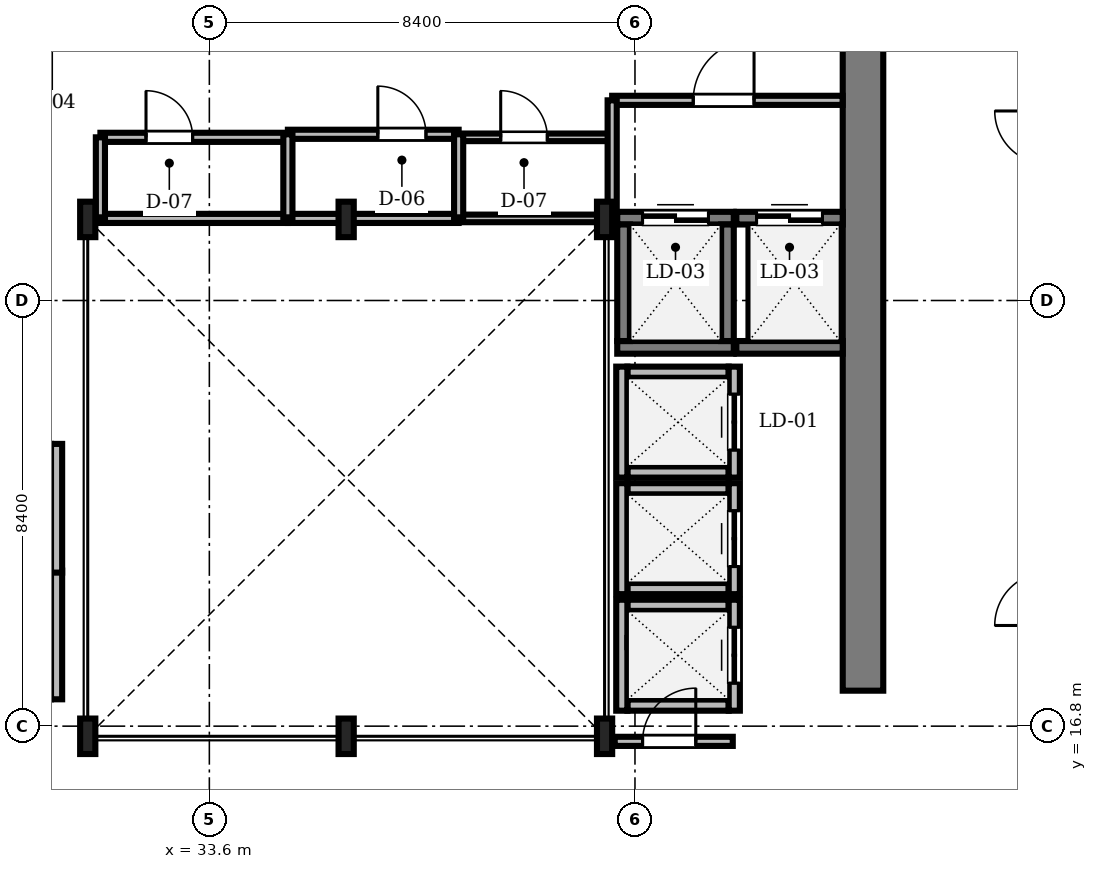
"""IFC4 building model, lengths in metres.
Left out: names, types, materials, properties, quantities, classifications, styles, units other than length and angle.
Written with IfcOpenShell. Run it as: python <this file> out.ifc"""

import sys

from ifc_helpers import new_model, si_unit, direction, frame, frame_2d, origin, origin_2d, place, context, subcontext, project, spatial, rectangle, i_section, extrude, source, transform, mapped, element, fill, save


model = new_model("IFC4")
c1 = context("Model", 3, precision=1e-05, world=origin(), true_north=direction((0.0, 1.0)))
c2 = subcontext(c1, "Body", "Model", "MODEL_VIEW")
j1 = project(units=[si_unit("LENGTHUNIT", "METRE"), si_unit("PLANEANGLEUNIT", "RADIAN")], contexts=[c1])
p1 = place(None, origin())
s1 = spatial("IfcSite", under=j1, at=p1, CompositionType="ELEMENT")
p2 = place(p1, origin())
s2 = spatial("IfcBuilding", under=s1, at=p2, CompositionType="ELEMENT")
p3 = place(p2, frame((0.0, 0.0, 218.55)))
s3 = spatial("IfcBuildingStorey", under=s2, at=p3, CompositionType="ELEMENT", Elevation=218.55)
m1 = source(origin(), c2, "Body", "SweptSolid", [
    extrude(rectangle(XDim=13.15, YDim=0.8, at=frame_2d((6.575, 0.0))), origin(), (0.0, 0.0, 1.0), 3.53),
])
p4 = place(p3, frame((46.5, 17.5, 0.0), z_axis=(0.0, 0.0, 1.0), x_axis=(0.0, 1.0, 0.0)))
e1 = element("IfcWall", 1, at=p4, inside=s3, PredefinedType="SHEAR", context=c2, shape_type="MappedRepresentation", body=[
    mapped(m1, transform((0.0, 0.0, 0.0), scale=1.0)),
])
m2 = source(origin(), c2, "Body", "SweptSolid", [
    extrude(i_section(OverallWidth=0.3, OverallDepth=0.7, WebThickness=0.017, FlangeThickness=0.032, FilletRadius=0.027, at=origin_2d()), origin(), (0.0, 0.0, 1.0), 3.53),
])
for number, where, z_axis, x_axis in (
    (2, (31.2, 16.6, 0.0), (0.0, 0.0, 1.0), (1.0, 0.0, 0.0)),
    (3, (36.3, 16.6, 0.0), (0.0, 0.0, 1.0), (1.0, 0.0, 0.0)),
    (4, (41.4, 16.6, 0.0), (0.0, 0.0, 1.0), (1.0, 0.0, 0.0)),
    (5, (41.4, 26.8, 0.0), (0.0, 0.0, 1.0), (1.0, 0.0, 0.0)),
    (6, (36.3, 26.8, 0.0), (0.0, 0.0, 1.0), (1.0, 0.0, 0.0)),
    (7, (31.2, 26.8, 0.0), (0.0, 0.0, 1.0), (1.0, 0.0, 0.0)),
):
    element("IfcColumn", number, at=place(p3, frame(where, z_axis=z_axis, x_axis=x_axis)), inside=s3, PredefinedType="COLUMN", context=c2, shape_type="MappedRepresentation", body=[
        mapped(m2, transform((0.0, 0.0, 0.0), scale=1.0)),
    ])
m3 = source(origin(), c2, "Body", "SweptSolid", [
    extrude(rectangle(XDim=2.0, YDim=0.22, at=frame_2d((1.0, 0.0))), origin(), (0.0, 0.0, 1.0), 3.53),
])
for number, where, z_axis, x_axis in (
    (8, (41.85, 21.815, 0.0), (0.0, 0.0, 1.0), (1.0, 0.0, 0.0)),
    (9, (41.85, 23.785, 0.0), (0.0, 0.0, 1.0), (1.0, 0.0, 0.0)),
):
    element("IfcWall", number, at=place(p3, frame(where, z_axis=z_axis, x_axis=x_axis)), inside=s3, PredefinedType="SOLIDWALL", context=c2, shape_type="MappedRepresentation", body=[
        mapped(m3, transform((0.0, 0.0, 0.0), scale=1.0)),
    ])
m4 = source(origin(), c2, "Body", "SweptSolid", [
    extrude(rectangle(XDim=2.19, YDim=0.22, at=frame_2d((1.095, 0.0))), origin(), (0.0, 0.0, 1.0), 3.53),
])
p5 = place(p3, frame((41.74, 21.705, 0.0), z_axis=(0.0, 0.0, 1.0), x_axis=(0.0, 1.0, 0.0)))
e10 = element("IfcWall", 10, at=p5, inside=s3, PredefinedType="SOLIDWALL", context=c2, shape_type="MappedRepresentation", body=[
    mapped(m4, transform((0.0, 0.0, 0.0), scale=1.0)),
])
p6 = place(p3, frame((43.96, 21.705, 0.0), z_axis=(0.0, 0.0, 1.0), x_axis=(0.0, 1.0, 0.0)))
e11 = element("IfcWall", 11, at=p6, inside=s3, PredefinedType="SOLIDWALL", context=c2, shape_type="MappedRepresentation", body=[
    mapped(m4, transform((0.0, 0.0, 0.0), scale=1.0)),
])
m5 = source(origin(), c2, "Body", "SweptSolid", [
    extrude(rectangle(XDim=1.1, YDim=2.2, at=frame_2d((0.55, 1.1))), frame((0.0, 0.12, 0.0), z_axis=(0.0, -1.0, 0.0), x_axis=(1.0, 0.0, 0.0)), (0.0, 0.0, 1.0), 0.24),
])
p7 = place(p6, frame((0.545, 0.0, 0.0)))
e12 = element("IfcOpeningElement", 12, at=p7, cuts=e11, PredefinedType="OPENING", context=c2, shape_type="MappedRepresentation", body=[
    mapped(m5, transform((0.0, 0.0, 0.0), scale=1.0)),
])
for number, where, z_axis, x_axis in (
    (13, (41.85, 19.515, 0.0), (0.0, 0.0, 1.0), (1.0, 0.0, 0.0)),
    (14, (41.85, 21.485, 0.0), (0.0, 0.0, 1.0), (1.0, 0.0, 0.0)),
):
    element("IfcWall", number, at=place(p3, frame(where, z_axis=z_axis, x_axis=x_axis)), inside=s3, PredefinedType="SOLIDWALL", context=c2, shape_type="MappedRepresentation", body=[
        mapped(m3, transform((0.0, 0.0, 0.0), scale=1.0)),
    ])
p8 = place(p3, frame((41.74, 19.405, 0.0), z_axis=(0.0, 0.0, 1.0), x_axis=(0.0, 1.0, 0.0)))
e15 = element("IfcWall", 15, at=p8, inside=s3, PredefinedType="SOLIDWALL", context=c2, shape_type="MappedRepresentation", body=[
    mapped(m4, transform((0.0, 0.0, 0.0), scale=1.0)),
])
p9 = place(p3, frame((43.96, 19.405, 0.0), z_axis=(0.0, 0.0, 1.0), x_axis=(0.0, 1.0, 0.0)))
e16 = element("IfcWall", 16, at=p9, inside=s3, PredefinedType="SOLIDWALL", context=c2, shape_type="MappedRepresentation", body=[
    mapped(m4, transform((0.0, 0.0, 0.0), scale=1.0)),
])
p10 = place(p9, frame((0.545, 0.0, 0.0)))
e17 = element("IfcOpeningElement", 17, at=p10, cuts=e16, PredefinedType="OPENING", context=c2, shape_type="MappedRepresentation", body=[
    mapped(m5, transform((0.0, 0.0, 0.0), scale=1.0)),
])
for number, where, z_axis, x_axis in (
    (18, (41.85, 17.215, 0.0), (0.0, 0.0, 1.0), (1.0, 0.0, 0.0)),
    (19, (41.85, 19.185, 0.0), (0.0, 0.0, 1.0), (1.0, 0.0, 0.0)),
):
    element("IfcWall", number, at=place(p3, frame(where, z_axis=z_axis, x_axis=x_axis)), inside=s3, PredefinedType="SOLIDWALL", context=c2, shape_type="MappedRepresentation", body=[
        mapped(m3, transform((0.0, 0.0, 0.0), scale=1.0)),
    ])
p11 = place(p3, frame((41.74, 17.105, 0.0), z_axis=(0.0, 0.0, 1.0), x_axis=(0.0, 1.0, 0.0)))
e20 = element("IfcWall", 20, at=p11, inside=s3, PredefinedType="SOLIDWALL", context=c2, shape_type="MappedRepresentation", body=[
    mapped(m4, transform((0.0, 0.0, 0.0), scale=1.0)),
])
p12 = place(p3, frame((43.96, 17.105, 0.0), z_axis=(0.0, 0.0, 1.0), x_axis=(0.0, 1.0, 0.0)))
e21 = element("IfcWall", 21, at=p12, inside=s3, PredefinedType="SOLIDWALL", context=c2, shape_type="MappedRepresentation", body=[
    mapped(m4, transform((0.0, 0.0, 0.0), scale=1.0)),
])
p13 = place(p12, frame((0.545, 0.0, 0.0)))
e22 = element("IfcOpeningElement", 22, at=p13, cuts=e21, PredefinedType="OPENING", context=c2, shape_type="MappedRepresentation", body=[
    mapped(m5, transform((0.0, 0.0, 0.0), scale=1.0)),
])
m6 = source(origin(), c2, "Body", "SweptSolid", [
    extrude(rectangle(XDim=2.54, YDim=0.22, at=frame_2d((1.27, 0.0))), origin(), (0.0, 0.0, 1.0), 3.53),
])
for number, where, z_axis, x_axis in (
    (23, (30.585, 17.33, 0.0), (0.0, 0.0, 1.0), (0.0, 1.0, 0.0)),
    (24, (30.585, 19.83, 0.0), (0.0, 0.0, 1.0), (0.0, 1.0, 0.0)),
):
    element("IfcWall", number, at=place(p3, frame(where, z_axis=z_axis, x_axis=x_axis)), inside=s3, PredefinedType="SOLIDWALL", context=c2, shape_type="MappedRepresentation", body=[
        mapped(m6, transform((0.0, 0.0, 0.0), scale=1.0)),
    ])
m7 = source(origin(), c2, "Body", "SweptSolid", [
    extrude(rectangle(XDim=2.3, YDim=0.25, at=frame_2d((1.15, 0.0))), origin(), (0.0, 0.0, 1.0), 3.53),
])
p14 = place(p3, frame((41.65, 24.275, 0.0), z_axis=(0.0, 0.0, 1.0), x_axis=(1.0, 0.0, 0.0)))
e25 = element("IfcWall", 25, at=p14, inside=s3, PredefinedType="SOLIDWALL", context=c2, shape_type="MappedRepresentation", body=[
    mapped(m7, transform((0.0, 0.0, 0.0), scale=1.0)),
])
p15 = place(p3, frame((41.65, 26.825, 0.0), z_axis=(0.0, 0.0, 1.0), x_axis=(1.0, 0.0, 0.0)))
e26 = element("IfcWall", 26, at=p15, inside=s3, PredefinedType="SOLIDWALL", context=c2, shape_type="MappedRepresentation", body=[
    mapped(m7, transform((0.0, 0.0, 0.0), scale=1.0)),
])
m8 = source(origin(), c2, "Body", "SweptSolid", [
    extrude(rectangle(XDim=1.3, YDim=2.3, at=frame_2d((0.65, 1.15))), frame((0.0, 0.135, 0.0), z_axis=(0.0, -1.0, 0.0), x_axis=(1.0, 0.0, 0.0)), (0.0, 0.0, 1.0), 0.27),
])
p16 = place(p15, frame((0.5, 0.0, 0.0)))
e27 = element("IfcOpeningElement", 27, at=p16, cuts=e26, PredefinedType="OPENING", context=c2, shape_type="MappedRepresentation", body=[
    mapped(m8, transform((0.0, 0.0, 0.0), scale=1.0)),
])
for number, where, z_axis, x_axis in (
    (28, (41.775, 24.4, 0.0), (0.0, 0.0, 1.0), (0.0, 1.0, 0.0)),
    (29, (43.825, 24.4, 0.0), (0.0, 0.0, 1.0), (0.0, 1.0, 0.0)),
):
    element("IfcWall", number, at=place(p3, frame(where, z_axis=z_axis, x_axis=x_axis)), inside=s3, PredefinedType="SOLIDWALL", context=c2, shape_type="MappedRepresentation", body=[
        mapped(m7, transform((0.0, 0.0, 0.0), scale=1.0)),
    ])
m9 = source(origin(), c2, "Body", "SweptSolid", [
    extrude(rectangle(XDim=2.1, YDim=0.25, at=frame_2d((1.05, 0.0))), origin(), (0.0, 0.0, 1.0), 3.53),
])
p17 = place(p3, frame((44.0, 24.275, 0.0), z_axis=(0.0, 0.0, 1.0), x_axis=(1.0, 0.0, 0.0)))
e30 = element("IfcWall", 30, at=p17, inside=s3, PredefinedType="SOLIDWALL", context=c2, shape_type="MappedRepresentation", body=[
    mapped(m9, transform((0.0, 0.0, 0.0), scale=1.0)),
])
p18 = place(p3, frame((44.0, 26.825, 0.0), z_axis=(0.0, 0.0, 1.0), x_axis=(1.0, 0.0, 0.0)))
e31 = element("IfcWall", 31, at=p18, inside=s3, PredefinedType="SOLIDWALL", context=c2, shape_type="MappedRepresentation", body=[
    mapped(m9, transform((0.0, 0.0, 0.0), scale=1.0)),
])
p19 = place(p18, frame((0.4, 0.0, 0.0)))
e32 = element("IfcOpeningElement", 32, at=p19, cuts=e31, PredefinedType="OPENING", context=c2, shape_type="MappedRepresentation", body=[
    mapped(m8, transform((0.0, 0.0, 0.0), scale=1.0)),
])
m10 = source(origin(), c2, "Body", "SweptSolid", [
    extrude(rectangle(XDim=4.548, YDim=0.18, at=frame_2d((2.274, 0.0))), origin(), (0.0, 0.0, 1.0), 3.162),
])
p20 = place(p3, frame((41.55, 29.15, 0.0), z_axis=(0.0, 0.0, 1.0), x_axis=(1.0, 0.0, 0.0)))
e33 = element("IfcWall", 33, at=p20, inside=s3, PredefinedType="PARTITIONING", context=c2, shape_type="MappedRepresentation", body=[
    mapped(m10, transform((0.0, 0.0, 0.0), scale=1.0)),
])
m11 = source(origin(), c2, "Body", "SweptSolid", [
    extrude(rectangle(XDim=1.2, YDim=2.2, at=frame_2d((0.6, 1.1))), frame((0.0, 0.1, 0.0), z_axis=(0.0, -1.0, 0.0), x_axis=(1.0, 0.0, 0.0)), (0.0, 0.0, 1.0), 0.2),
])
p21 = place(p20, frame((1.6, 0.0, 0.0)))
e34 = element("IfcOpeningElement", 34, at=p21, cuts=e33, PredefinedType="OPENING", context=c2, shape_type="MappedRepresentation", body=[
    mapped(m11, transform((0.0, 0.0, 0.0), scale=1.0)),
])
m12 = source(origin(), c2, "Body", "SweptSolid", [
    extrude(rectangle(XDim=3.7, YDim=0.18, at=frame_2d((1.85, 0.0))), origin(), (0.0, 0.0, 1.0), 3.162),
])
p22 = place(p3, frame((31.45, 28.42, 0.0), z_axis=(0.0, 0.0, 1.0), x_axis=(1.0, 0.0, 0.0)))
e35 = element("IfcWall", 35, at=p22, inside=s3, PredefinedType="PARTITIONING", context=c2, shape_type="MappedRepresentation", body=[
    mapped(m12, transform((0.0, 0.0, 0.0), scale=1.0)),
])
m13 = source(origin(), c2, "Body", "SweptSolid", [
    extrude(rectangle(XDim=0.92, YDim=2.1, at=frame_2d((0.46, 1.05))), frame((0.0, 0.1, 0.0), z_axis=(0.0, -1.0, 0.0), x_axis=(1.0, 0.0, 0.0)), (0.0, 0.0, 1.0), 0.2),
])
p23 = place(p22, frame((0.9, 0.0, 0.0)))
e36 = element("IfcOpeningElement", 36, at=p23, cuts=e35, PredefinedType="OPENING", context=c2, shape_type="MappedRepresentation", body=[
    mapped(m13, transform((0.0, 0.0, 0.0), scale=1.0)),
])
m14 = source(origin(), c2, "Body", "SweptSolid", [
    extrude(rectangle(XDim=3.37, YDim=0.18, at=frame_2d((1.685, 0.0))), origin(), (0.0, 0.0, 1.0), 3.53),
])
p24 = place(p3, frame((35.15, 28.48, 0.0), z_axis=(0.0, 0.0, 1.0), x_axis=(1.0, 0.0, 0.0)))
e37 = element("IfcWall", 37, at=p24, inside=s3, PredefinedType="PARTITIONING", context=c2, shape_type="MappedRepresentation", body=[
    mapped(m14, transform((0.0, 0.0, 0.0), scale=1.0)),
])
m15 = source(origin(), c2, "Body", "SweptSolid", [
    extrude(rectangle(XDim=0.95, YDim=2.15, at=frame_2d((0.475, 1.075))), frame((0.0, 0.1, 0.0), z_axis=(0.0, -1.0, 0.0), x_axis=(1.0, 0.0, 0.0)), (0.0, 0.0, 1.0), 0.2),
])
p25 = place(p24, frame((1.775, 0.0, 0.0)))
e38 = element("IfcOpeningElement", 38, at=p25, cuts=e37, PredefinedType="OPENING", context=c2, shape_type="MappedRepresentation", body=[
    mapped(m15, transform((0.0, 0.0, 0.0), scale=1.0)),
])
m16 = source(origin(), c2, "Body", "SweptSolid", [
    extrude(rectangle(XDim=3.0, YDim=0.15, at=frame_2d((1.5, 0.0))), origin(), (0.0, 0.0, 1.0), 3.53),
])
p26 = place(p3, frame((38.52, 28.42, 0.0), z_axis=(0.0, 0.0, 1.0), x_axis=(1.0, 0.0, 0.0)))
e39 = element("IfcWall", 39, at=p26, inside=s3, PredefinedType="PARTITIONING", context=c2, shape_type="MappedRepresentation", body=[
    mapped(m16, transform((0.0, 0.0, 0.0), scale=1.0)),
])
m17 = source(origin(), c2, "Body", "SweptSolid", [
    extrude(rectangle(XDim=0.92, YDim=2.1, at=frame_2d((0.46, 1.05))), frame((0.0, 0.085, 0.0), z_axis=(0.0, -1.0, 0.0), x_axis=(1.0, 0.0, 0.0)), (0.0, 0.0, 1.0), 0.17),
])
p27 = place(p26, frame((0.83, 0.0, 0.0)))
e40 = element("IfcOpeningElement", 40, at=p27, cuts=e39, PredefinedType="OPENING", context=c2, shape_type="MappedRepresentation", body=[
    mapped(m17, transform((0.0, 0.0, 0.0), scale=1.0)),
])
m18 = source(origin(), c2, "Body", "SweptSolid", [
    extrude(rectangle(XDim=2.33, YDim=0.18, at=frame_2d((1.165, 0.0))), origin(), (0.0, 0.0, 1.0), 2.972),
])
p28 = place(p3, frame((41.6, 16.5, 0.0), z_axis=(0.0, 0.0, 1.0), x_axis=(1.0, 0.0, 0.0)))
e41 = element("IfcWall", 41, at=p28, inside=s3, PredefinedType="PARTITIONING", context=c2, shape_type="MappedRepresentation", body=[
    mapped(m18, transform((0.0, 0.0, 0.0), scale=1.0)),
])
m19 = source(origin(), c2, "Body", "SweptSolid", [
    extrude(rectangle(XDim=1.05, YDim=2.2, at=frame_2d((0.525, 1.1))), frame((0.0, 0.1, 0.0), z_axis=(0.0, -1.0, 0.0), x_axis=(1.0, 0.0, 0.0)), (0.0, 0.0, 1.0), 0.2),
])
p29 = place(p28, frame((0.55, 0.0, 0.0)))
e42 = element("IfcOpeningElement", 42, at=p29, cuts=e41, PredefinedType="OPENING", context=c2, shape_type="MappedRepresentation", body=[
    mapped(m19, transform((0.0, 0.0, 0.0), scale=1.0)),
])
m20 = source(origin(), c2, "Body", "SweptSolid", [
    extrude(rectangle(XDim=3.7, YDim=0.18, at=frame_2d((1.85, 0.0))), origin(), (0.0, 0.0, 1.0), 3.072),
])
p30 = place(p3, frame((31.45, 26.82, 0.0), z_axis=(0.0, 0.0, 1.0), x_axis=(1.0, 0.0, 0.0)))
e43 = element("IfcWall", 43, at=p30, inside=s3, PredefinedType="PARTITIONING", context=c2, shape_type="MappedRepresentation", body=[
    mapped(m20, transform((0.0, 0.0, 0.0), scale=1.0)),
])
m21 = source(origin(), c2, "Body", "SweptSolid", [
    extrude(rectangle(XDim=3.37, YDim=0.18, at=frame_2d((1.685, 0.0))), origin(), (0.0, 0.0, 1.0), 3.072),
])
p31 = place(p3, frame((35.15, 26.82, 0.0), z_axis=(0.0, 0.0, 1.0), x_axis=(1.0, 0.0, 0.0)))
e44 = element("IfcWall", 44, at=p31, inside=s3, PredefinedType="PARTITIONING", context=c2, shape_type="MappedRepresentation", body=[
    mapped(m21, transform((0.0, 0.0, 0.0), scale=1.0)),
])
m22 = source(origin(), c2, "Body", "SweptSolid", [
    extrude(rectangle(XDim=3.0, YDim=0.15, at=frame_2d((1.5, 0.0))), origin(), (0.0, 0.0, 1.0), 2.972),
])
p32 = place(p3, frame((38.52, 26.82, 0.0), z_axis=(0.0, 0.0, 1.0), x_axis=(1.0, 0.0, 0.0)))
e45 = element("IfcWall", 45, at=p32, inside=s3, PredefinedType="PARTITIONING", context=c2, shape_type="MappedRepresentation", body=[
    mapped(m22, transform((0.0, 0.0, 0.0), scale=1.0)),
])
m23 = source(origin(), c2, "Body", "SweptSolid", [
    extrude(rectangle(XDim=2.35, YDim=0.18, at=frame_2d((1.175, 0.0))), origin(), (0.0, 0.0, 1.0), 2.972),
])
p33 = place(p3, frame((41.55, 26.8, 0.0), z_axis=(0.0, 0.0, 1.0), x_axis=(0.0, 1.0, 0.0)))
e46 = element("IfcWall", 46, at=p33, inside=s3, PredefinedType="PARTITIONING", context=c2, shape_type="MappedRepresentation", body=[
    mapped(m23, transform((0.0, 0.0, 0.0), scale=1.0)),
])
m24 = source(origin(), c2, "Body", "SweptSolid", [
    extrude(rectangle(XDim=1.858, YDim=0.18, at=frame_2d((0.929, 0.0))), origin(), (0.0, 0.0, 1.0), 3.53),
])
p34 = place(p3, frame((41.852, 18.45, 0.0), z_axis=(0.0, 0.0, 1.0), x_axis=(1.0, 0.0, 0.0)))
e47 = element("IfcWall", 47, at=p34, inside=s3, PredefinedType="PARTITIONING", context=c2, shape_type="MappedRepresentation", body=[
    mapped(m24, transform((0.0, 0.0, 0.0), scale=1.0)),
])
m25 = source(origin(), c2, "Body", "SweptSolid", [
    extrude(rectangle(XDim=1.66, YDim=0.18, at=frame_2d((0.83, 0.0))), origin(), (0.0, 0.0, 1.0), 3.072),
])
for number, where, z_axis, x_axis in (
    (48, (35.15, 26.82, 0.0), (0.0, 0.0, 1.0), (0.0, 1.0, 0.0)),
    (49, (38.52, 26.82, 0.0), (0.0, 0.0, 1.0), (0.0, 1.0, 0.0)),
):
    element("IfcWall", number, at=place(p3, frame(where, z_axis=z_axis, x_axis=x_axis)), inside=s3, PredefinedType="PARTITIONING", context=c2, shape_type="MappedRepresentation", body=[
        mapped(m25, transform((0.0, 0.0, 0.0), scale=1.0)),
    ])
m26 = source(origin(), c2, "Body", "SweptSolid", [
    extrude(rectangle(XDim=1.6, YDim=0.18, at=frame_2d((0.8, 0.0))), origin(), (0.0, 0.0, 1.0), 3.072),
])
p35 = place(p3, frame((31.45, 26.82, 0.0), z_axis=(0.0, 0.0, 1.0), x_axis=(0.0, 1.0, 0.0)))
e50 = element("IfcWall", 50, at=p35, inside=s3, PredefinedType="PARTITIONING", context=c2, shape_type="MappedRepresentation", body=[
    mapped(m26, transform((0.0, 0.0, 0.0), scale=1.0)),
])
m27 = source(origin(), c2, "Body", "SweptSolid", [
    extrude(rectangle(XDim=1.1, YDim=2.2, at=frame_2d((0.55, 1.1))), frame((0.0, 0.025, 0.0), z_axis=(0.0, -1.0, 0.0), x_axis=(1.0, 0.0, 0.0)), (0.0, 0.0, 1.0), 0.05),
])
p36 = place(p7, origin())
e51 = element("IfcDoor", 51, at=p36, inside=s3, OperationType="DOUBLE_DOOR_SLIDING", PredefinedType="DOOR", context=c2, shape_type="MappedRepresentation", body=[
    mapped(m27, transform((0.0, 0.0, 0.0), scale=1.0)),
])
fill(e12, e51)
p37 = place(p10, origin())
e52 = element("IfcDoor", 52, at=p37, inside=s3, OperationType="DOUBLE_DOOR_SLIDING", PredefinedType="DOOR", context=c2, shape_type="MappedRepresentation", body=[
    mapped(m27, transform((0.0, 0.0, 0.0), scale=1.0)),
])
fill(e17, e52)
p38 = place(p13, origin())
e53 = element("IfcDoor", 53, at=p38, inside=s3, OperationType="DOUBLE_DOOR_SLIDING", PredefinedType="DOOR", context=c2, shape_type="MappedRepresentation", body=[
    mapped(m27, transform((0.0, 0.0, 0.0), scale=1.0)),
])
fill(e22, e53)
m28 = source(origin(), c2, "Body", "SweptSolid", [
    extrude(rectangle(XDim=1.3, YDim=2.3, at=frame_2d((0.65, 1.15))), frame((0.0, 0.025, 0.0), z_axis=(0.0, -1.0, 0.0), x_axis=(1.0, 0.0, 0.0)), (0.0, 0.0, 1.0), 0.05),
])
p39 = place(p16, origin())
e54 = element("IfcDoor", 54, at=p39, inside=s3, OperationType="DOUBLE_DOOR_SLIDING", PredefinedType="DOOR", context=c2, shape_type="MappedRepresentation", body=[
    mapped(m28, transform((0.0, 0.0, 0.0), scale=1.0)),
])
fill(e27, e54)
p40 = place(p19, origin())
e55 = element("IfcDoor", 55, at=p40, inside=s3, OperationType="DOUBLE_DOOR_SLIDING", PredefinedType="DOOR", context=c2, shape_type="MappedRepresentation", body=[
    mapped(m28, transform((0.0, 0.0, 0.0), scale=1.0)),
])
fill(e32, e55)
m29 = source(origin(), c2, "Body", "SweptSolid", [
    extrude(rectangle(XDim=1.2, YDim=2.2, at=frame_2d((0.6, 1.1))), frame((0.0, 0.025, 0.0), z_axis=(0.0, -1.0, 0.0), x_axis=(1.0, 0.0, 0.0)), (0.0, 0.0, 1.0), 0.05),
])
p41 = place(p21, origin())
e56 = element("IfcDoor", 56, at=p41, inside=s3, OperationType="SINGLE_SWING_RIGHT", PredefinedType="DOOR", context=c2, shape_type="MappedRepresentation", body=[
    mapped(m29, transform((0.0, 0.0, 0.0), scale=1.0)),
])
fill(e34, e56)
m30 = source(origin(), c2, "Body", "SweptSolid", [
    extrude(rectangle(XDim=0.92, YDim=2.1, at=frame_2d((0.46, 1.05))), frame((0.0, 0.025, 0.0), z_axis=(0.0, -1.0, 0.0), x_axis=(1.0, 0.0, 0.0)), (0.0, 0.0, 1.0), 0.05),
])
p42 = place(p23, origin())
e57 = element("IfcDoor", 57, at=p42, inside=s3, OperationType="SINGLE_SWING_LEFT", PredefinedType="DOOR", context=c2, shape_type="MappedRepresentation", body=[
    mapped(m30, transform((0.0, 0.0, 0.0), scale=1.0)),
])
fill(e36, e57)
m31 = source(origin(), c2, "Body", "SweptSolid", [
    extrude(rectangle(XDim=0.95, YDim=2.15, at=frame_2d((0.475, 1.075))), frame((0.0, 0.025, 0.0), z_axis=(0.0, -1.0, 0.0), x_axis=(1.0, 0.0, 0.0)), (0.0, 0.0, 1.0), 0.05),
])
p43 = place(p25, origin())
e58 = element("IfcDoor", 58, at=p43, inside=s3, OperationType="SINGLE_SWING_LEFT", PredefinedType="DOOR", context=c2, shape_type="MappedRepresentation", body=[
    mapped(m31, transform((0.0, 0.0, 0.0), scale=1.0)),
])
fill(e38, e58)
p44 = place(p27, origin())
e59 = element("IfcDoor", 59, at=p44, inside=s3, OperationType="SINGLE_SWING_LEFT", PredefinedType="DOOR", context=c2, shape_type="MappedRepresentation", body=[
    mapped(m30, transform((0.0, 0.0, 0.0), scale=1.0)),
])
fill(e40, e59)
m32 = source(origin(), c2, "Body", "SweptSolid", [
    extrude(rectangle(XDim=1.05, YDim=2.2, at=frame_2d((0.525, 1.1))), frame((0.0, 0.025, 0.0), z_axis=(0.0, -1.0, 0.0), x_axis=(1.0, 0.0, 0.0)), (0.0, 0.0, 1.0), 0.05),
])
p45 = place(p29, origin())
e60 = element("IfcDoor", 60, at=p45, inside=s3, OperationType="SINGLE_SWING_RIGHT", PredefinedType="DOOR", context=c2, shape_type="MappedRepresentation", body=[
    mapped(m32, transform((0.0, 0.0, 0.0), scale=1.0)),
])
fill(e42, e60)
save(model, sys.argv[1])
